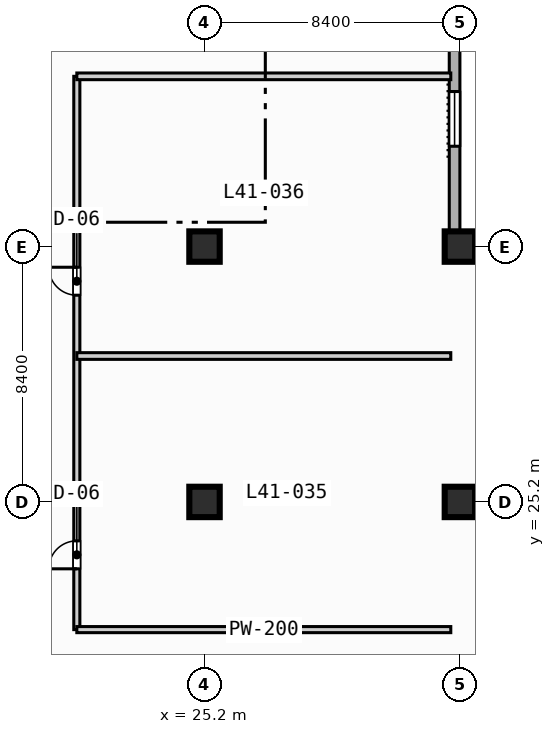
"""IFC4 building model, lengths in metres.
Left out: names, types, materials, properties, quantities, classifications, styles, units other than length and angle.
Written with IfcOpenShell. Run it as: python <this file> out.ifc"""

import sys

from ifc_helpers import new_model, si_unit, direction, frame, frame_2d, origin, origin_2d, place, context, subcontext, project, spatial, rectangle, extrude, element, fill, save


model = new_model("IFC4")
c1 = context("Model", 3, precision=1e-05, world=origin(), true_north=direction((0.0, 1.0)))
c2 = subcontext(c1, "Body", "Model", "MODEL_VIEW")
j1 = project(units=[si_unit("LENGTHUNIT", "METRE"), si_unit("PLANEANGLEUNIT", "RADIAN")], contexts=[c1])
p1 = place(None, origin())
s1 = spatial("IfcSite", under=j1, at=p1, CompositionType="ELEMENT")
p2 = place(p1, origin())
s2 = spatial("IfcBuilding", under=s1, at=p2, CompositionType="ELEMENT")
p3 = place(p2, frame((0.0, 0.0, 171.7)))
s3 = spatial("IfcBuildingStorey", under=s2, at=p3, CompositionType="ELEMENT", Elevation=171.7)
for number, where, z_axis, x_axis in (
    (1, (25.2, 25.2, 0.0), (0.0, 0.0, 1.0), (1.0, 0.0, 0.0)),
    (2, (25.2, 33.6, 0.0), (0.0, 0.0, 1.0), (1.0, 0.0, 0.0)),
    (3, (33.6, 25.2, 0.0), (0.0, 0.0, 1.0), (1.0, 0.0, 0.0)),
    (4, (33.6, 33.6, 0.0), (0.0, 0.0, 1.0), (1.0, 0.0, 0.0)),
):
    element("IfcColumn", number, at=place(p3, frame(where, z_axis=z_axis, x_axis=x_axis)), inside=s3, PredefinedType="COLUMN", context=c2, shape_type="SweptSolid", body=[
        extrude(rectangle(XDim=1.0, YDim=1.0, at=origin_2d()), origin(), (0.0, 0.0, 1.0), 3.7),
    ])
p4 = place(p3, frame((33.425, 72.425, 0.0), z_axis=(0.0, 0.0, 1.0), x_axis=(0.0, -1.0, 0.0)))
e5 = element("IfcWall", 5, at=p4, inside=s3, PredefinedType="STANDARD", context=c2, shape_type="SweptSolid", body=[
    extrude(rectangle(XDim=39.0, YDim=0.35, at=frame_2d((19.5, 0.0))), origin(), (0.0, 0.0, 1.0), 3.47),
])
p5 = place(p4, frame((33.725, 0.0, 0.85)))
e6 = element("IfcOpeningElement", 6, at=p5, cuts=e5, PredefinedType="OPENING", context=c2, shape_type="SweptSolid", body=[
    extrude(rectangle(XDim=1.8, YDim=1.8, at=frame_2d((0.9, 0.9))), frame((0.0, 0.185, 0.0), z_axis=(0.0, -1.0, 0.0), x_axis=(1.0, 0.0, 0.0)), (0.0, 0.0, 1.0), 0.37),
])
p6 = place(p4, frame((16.925, 0.0, 0.85)))
e7 = element("IfcOpeningElement", 7, at=p6, cuts=e5, PredefinedType="OPENING", context=c2, shape_type="SweptSolid", body=[
    extrude(rectangle(XDim=1.8, YDim=1.8, at=frame_2d((0.9, 0.9))), frame((0.0, 0.185, 0.0), z_axis=(0.0, -1.0, 0.0), x_axis=(1.0, 0.0, 0.0)), (0.0, 0.0, 1.0), 0.37),
])
p7 = place(p4, frame((8.225, 0.0, 0.85)))
e8 = element("IfcOpeningElement", 8, at=p7, cuts=e5, PredefinedType="OPENING", context=c2, shape_type="SweptSolid", body=[
    extrude(rectangle(XDim=2.4, YDim=1.95, at=frame_2d((1.2, 0.975))), frame((0.0, 0.185, 0.0), z_axis=(0.0, -1.0, 0.0), x_axis=(1.0, 0.0, 0.0)), (0.0, 0.0, 1.0), 0.37),
])
p8 = place(p3, frame((33.425, 33.425, 0.0), z_axis=(0.0, 0.0, 1.0), x_axis=(1.0, 0.0, 0.0)))
e9 = element("IfcWall", 9, at=p8, inside=s3, PredefinedType="STANDARD", context=c2, shape_type="SweptSolid", body=[
    extrude(rectangle(XDim=39.0, YDim=0.35, at=frame_2d((19.5, 0.0))), origin(), (0.0, 0.0, 1.0), 3.47),
])
p9 = place(p8, frame((12.075, 0.0, 0.0)))
e10 = element("IfcOpeningElement", 10, at=p9, cuts=e9, PredefinedType="OPENING", context=c2, shape_type="SweptSolid", body=[
    extrude(rectangle(XDim=1.4, YDim=2.2, at=frame_2d((0.7, 1.1))), frame((0.0, 0.185, 0.0), z_axis=(0.0, -1.0, 0.0), x_axis=(1.0, 0.0, 0.0)), (0.0, 0.0, 1.0), 0.37),
])
p10 = place(p8, frame((20.275, 0.0, 0.85)))
e11 = element("IfcOpeningElement", 11, at=p10, cuts=e9, PredefinedType="OPENING", context=c2, shape_type="SweptSolid", body=[
    extrude(rectangle(XDim=1.8, YDim=1.8, at=frame_2d((0.9, 0.9))), frame((0.0, 0.185, 0.0), z_axis=(0.0, -1.0, 0.0), x_axis=(1.0, 0.0, 0.0)), (0.0, 0.0, 1.0), 0.37),
])
p11 = place(p8, frame((28.375, 0.0, 0.85)))
e12 = element("IfcOpeningElement", 12, at=p11, cuts=e9, PredefinedType="OPENING", context=c2, shape_type="SweptSolid", body=[
    extrude(rectangle(XDim=2.4, YDim=1.95, at=frame_2d((1.2, 0.975))), frame((0.0, 0.185, 0.0), z_axis=(0.0, -1.0, 0.0), x_axis=(1.0, 0.0, 0.0)), (0.0, 0.0, 1.0), 0.37),
])
p12 = place(p3, frame((21.0, 21.0, 0.0), z_axis=(0.0, 0.0, 1.0), x_axis=(0.0, 1.0, 0.0)))
e13 = element("IfcWall", 13, at=p12, inside=s3, PredefinedType="PARTITIONING", context=c2, shape_type="SweptSolid", body=[
    extrude(rectangle(XDim=18.2, YDim=0.2, at=frame_2d((9.1, 0.0))), origin(), (0.0, 0.0, 1.0), 3.47),
])
p13 = place(p12, frame((2.0, 0.0, 0.0)))
e14 = element("IfcOpeningElement", 14, at=p13, cuts=e13, PredefinedType="OPENING", context=c2, shape_type="SweptSolid", body=[
    extrude(rectangle(XDim=0.92, YDim=2.1, at=frame_2d((0.46, 1.05))), frame((0.0, 0.11, 0.0), z_axis=(0.0, -1.0, 0.0), x_axis=(1.0, 0.0, 0.0)), (0.0, 0.0, 1.0), 0.22),
])
p14 = place(p12, frame((11.0, 0.0, 0.0)))
e15 = element("IfcOpeningElement", 15, at=p14, cuts=e13, PredefinedType="OPENING", context=c2, shape_type="SweptSolid", body=[
    extrude(rectangle(XDim=0.92, YDim=2.1, at=frame_2d((0.46, 1.05))), frame((0.0, 0.11, 0.0), z_axis=(0.0, -1.0, 0.0), x_axis=(1.0, 0.0, 0.0)), (0.0, 0.0, 1.0), 0.22),
])
p15 = place(p3, frame((21.0, 21.0, 0.0), z_axis=(0.0, 0.0, 1.0), x_axis=(1.0, 0.0, 0.0)))
e16 = element("IfcWall", 16, at=p15, inside=s3, PredefinedType="PARTITIONING", context=c2, shape_type="SweptSolid", body=[
    extrude(rectangle(XDim=12.3, YDim=0.2, at=frame_2d((6.15, 0.0))), origin(), (0.0, 0.0, 1.0), 3.47),
])
for number, where, z_axis, x_axis in (
    (17, (21.0, 30.0, 0.0), (0.0, 0.0, 1.0), (1.0, 0.0, 0.0)),
    (18, (21.0, 39.2, 0.0), (0.0, 0.0, 1.0), (1.0, 0.0, 0.0)),
):
    element("IfcWall", number, at=place(p3, frame(where, z_axis=z_axis, x_axis=x_axis)), inside=s3, PredefinedType="PARTITIONING", context=c2, shape_type="SweptSolid", body=[
        extrude(rectangle(XDim=12.3, YDim=0.22, at=frame_2d((6.15, 0.0))), origin(), (0.0, 0.0, 1.0), 3.47),
    ])
p16 = place(p5, origin())
e19 = element("IfcWindow", 19, at=p16, inside=s3, PartitioningType="SINGLE_PANEL", PredefinedType="WINDOW", context=c2, shape_type="SweptSolid", body=[
    extrude(rectangle(XDim=1.8, YDim=1.8, at=frame_2d((0.9, 0.9))), frame((0.0, 0.03, 0.0), z_axis=(0.0, -1.0, 0.0), x_axis=(1.0, 0.0, 0.0)), (0.0, 0.0, 1.0), 0.06),
])
fill(e6, e19)
p17 = place(p13, origin())
e20 = element("IfcDoor", 20, at=p17, inside=s3, OperationType="SINGLE_SWING_LEFT", PredefinedType="DOOR", context=c2, shape_type="SweptSolid", body=[
    extrude(rectangle(XDim=0.92, YDim=2.1, at=frame_2d((0.46, 1.05))), frame((0.0, 0.025, 0.0), z_axis=(0.0, -1.0, 0.0), x_axis=(1.0, 0.0, 0.0)), (0.0, 0.0, 1.0), 0.05),
])
fill(e14, e20)
p18 = place(p14, origin())
e21 = element("IfcDoor", 21, at=p18, inside=s3, OperationType="SINGLE_SWING_RIGHT", PredefinedType="DOOR", context=c2, shape_type="SweptSolid", body=[
    extrude(rectangle(XDim=0.92, YDim=2.1, at=frame_2d((0.46, 1.05))), frame((0.0, 0.025, 0.0), z_axis=(0.0, -1.0, 0.0), x_axis=(1.0, 0.0, 0.0)), (0.0, 0.0, 1.0), 0.05),
])
fill(e15, e21)
save(model, sys.argv[1])
